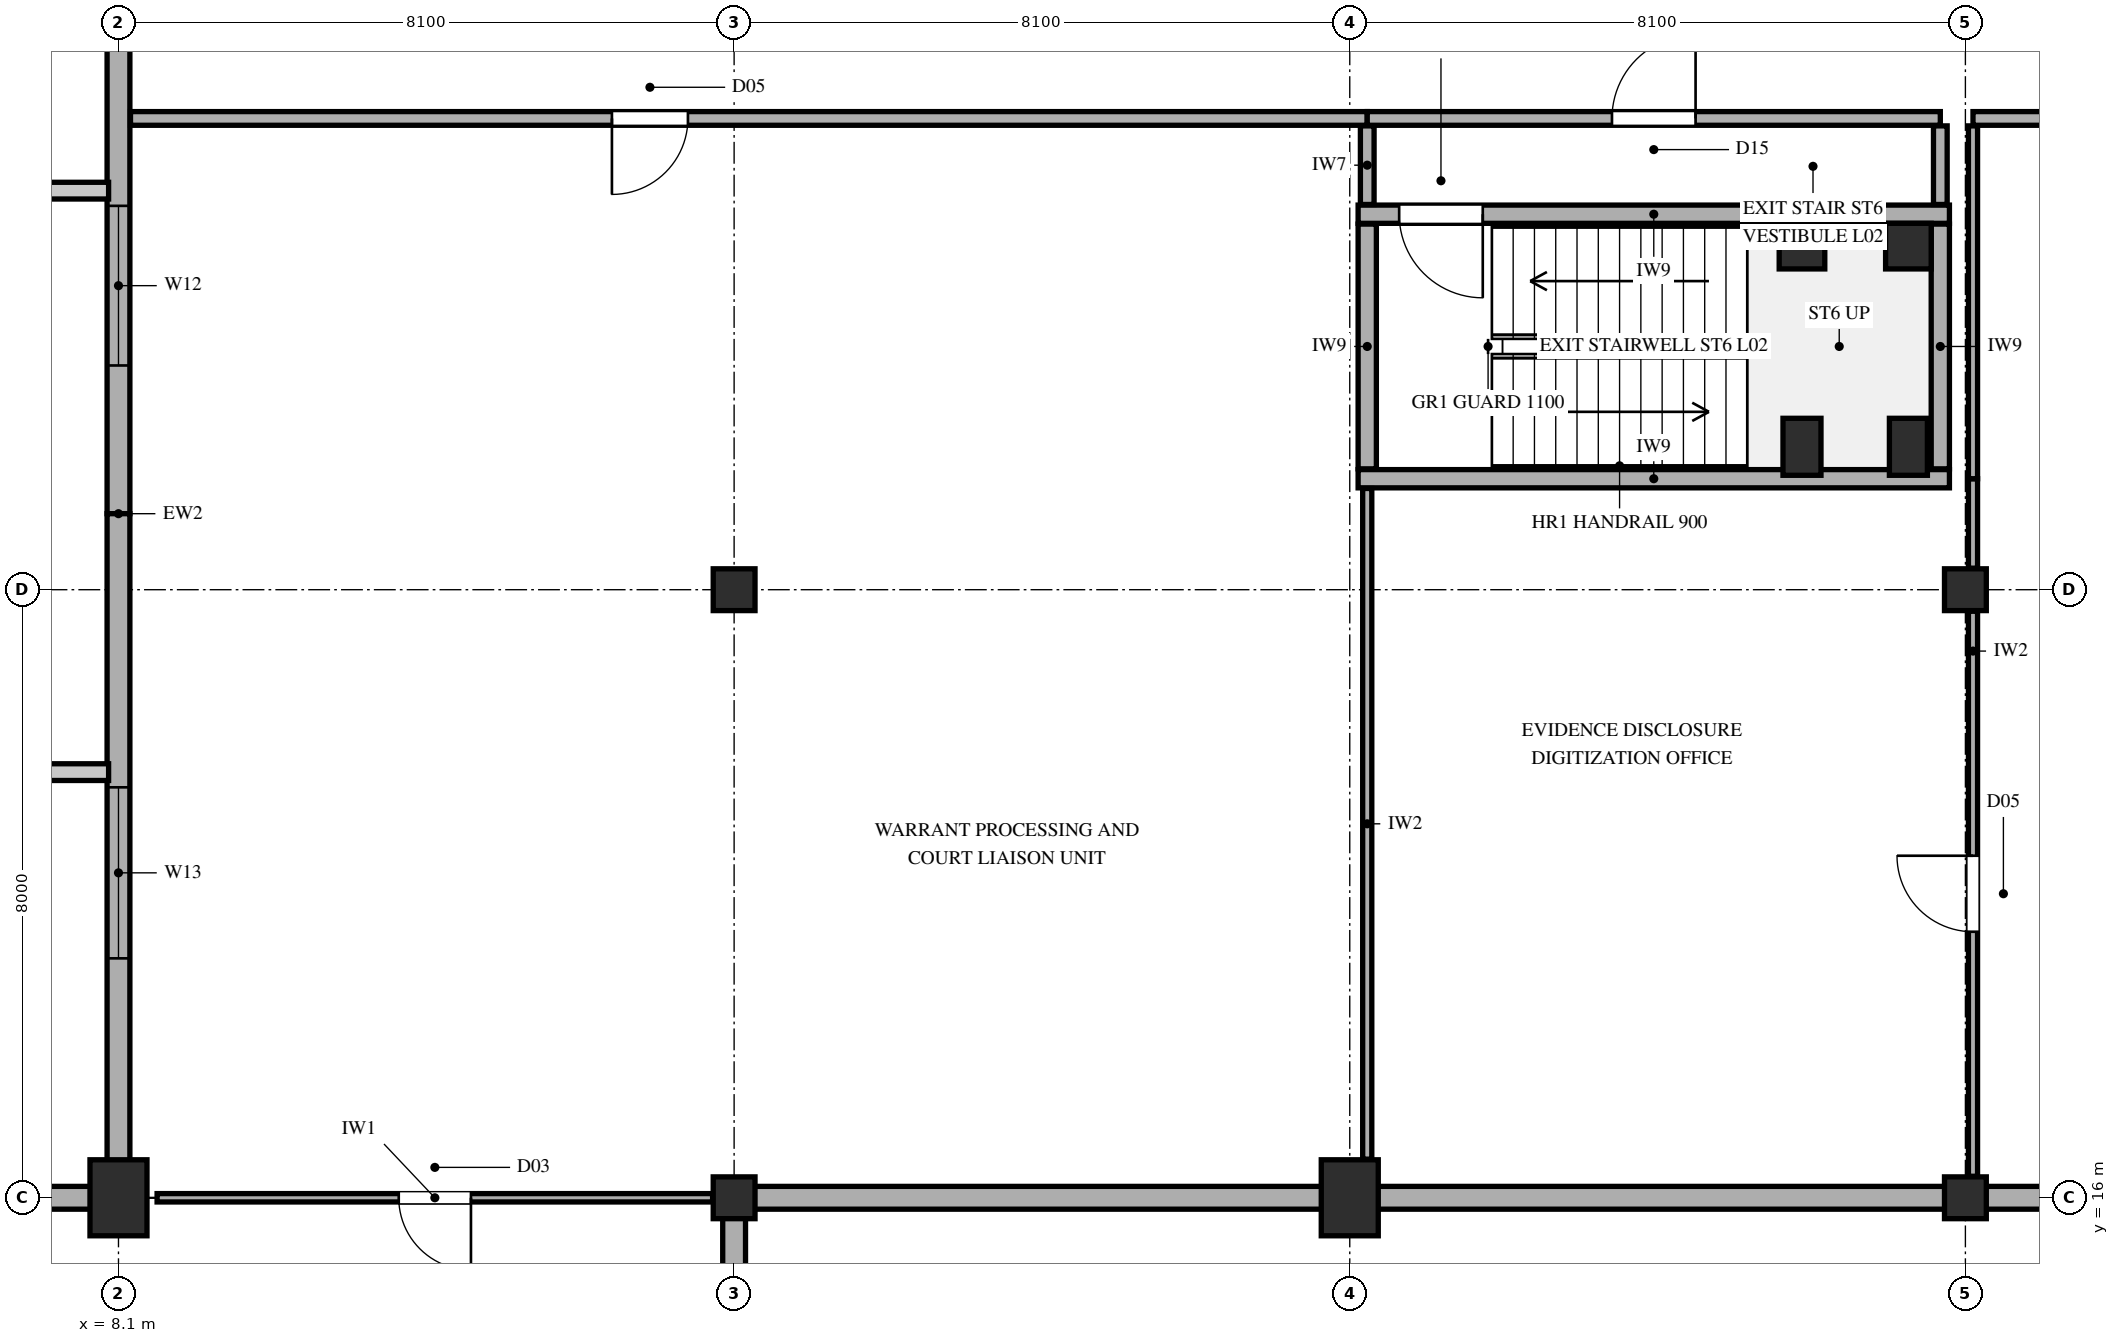
"""IFC4 building model, lengths in metres.
Left out: names, types, materials, properties, quantities, classifications, styles, units other than length and angle.
Written with IfcOpenShell. Run it as: python <this file> out.ifc"""

import sys

from ifc_helpers import new_model, si_unit, direction, frame, frame_2d, origin, origin_2d, place, context, subcontext, project, spatial, rectangle, extrude, element, fill, save


model = new_model("IFC4")
c1 = context("Model", 3, precision=1e-05, world=origin(), true_north=direction((0.0, 1.0)))
c2 = subcontext(c1, "Body", "Model", "MODEL_VIEW")
j1 = project(units=[si_unit("LENGTHUNIT", "METRE"), si_unit("PLANEANGLEUNIT", "RADIAN")], contexts=[c1])
p1 = place(None, origin())
s1 = spatial("IfcSite", under=j1, at=p1, CompositionType="ELEMENT")
p2 = place(p1, origin())
s2 = spatial("IfcBuilding", under=s1, at=p2, CompositionType="ELEMENT")
p3 = place(p2, frame((0.0, 0.0, 10.2)))
s3 = spatial("IfcBuildingStorey", under=s2, at=p3, CompositionType="ELEMENT", Elevation=10.2)
p4 = place(p3, frame((8.1, 16.0, 0.0), z_axis=(0.0, 0.0, 1.0), x_axis=(1.0, 0.0, 0.0)))
e1 = element("IfcColumn", 1, at=p4, inside=s3, PredefinedType="COLUMN", context=c2, shape_type="SweptSolid", body=[
    extrude(rectangle(XDim=0.75, YDim=1.0, at=origin_2d()), origin(), (0.0, 0.0, 1.0), 4.5),
])
for number, where, z_axis, x_axis in (
    (2, (16.2, 16.0, 0.0), (0.0, 0.0, 1.0), (1.0, 0.0, 0.0)),
    (3, (16.2, 24.0, 0.0), (0.0, 0.0, 1.0), (1.0, 0.0, 0.0)),
):
    element("IfcColumn", number, at=place(p3, frame(where, z_axis=z_axis, x_axis=x_axis)), inside=s3, PredefinedType="COLUMN", context=c2, shape_type="SweptSolid", body=[
        extrude(rectangle(XDim=0.55, YDim=0.55, at=origin_2d()), origin(), (0.0, 0.0, 1.0), 4.24),
    ])
p5 = place(p3, frame((24.3, 16.0, 0.0), z_axis=(0.0, 0.0, 1.0), x_axis=(1.0, 0.0, 0.0)))
e4 = element("IfcColumn", 4, at=p5, inside=s3, PredefinedType="COLUMN", context=c2, shape_type="SweptSolid", body=[
    extrude(rectangle(XDim=0.75, YDim=1.0, at=origin_2d()), origin(), (0.0, 0.0, 1.0), 4.5),
])
p6 = place(p3, frame((30.25, 25.88, 0.0), z_axis=(0.0, 0.0, 1.0), x_axis=(1.0, 0.0, 0.0)))
e5 = element("IfcColumn", 5, at=p6, inside=s3, PredefinedType="COLUMN", context=c2, shape_type="SweptSolid", body=[
    extrude(rectangle(XDim=0.5, YDim=0.75, at=origin_2d()), origin(), (0.0, 0.0, 1.0), 4.5),
])
p7 = place(p3, frame((30.25, 28.52, 0.0), z_axis=(0.0, 0.0, 1.0), x_axis=(1.0, 0.0, 0.0)))
e6 = element("IfcColumn", 6, at=p7, inside=s3, PredefinedType="COLUMN", context=c2, shape_type="SweptSolid", body=[
    extrude(rectangle(XDim=0.6, YDim=0.6, at=origin_2d()), origin(), (0.0, 0.0, 1.0), 4.5),
])
p8 = place(p3, frame((31.65, 25.88, 0.0), z_axis=(0.0, 0.0, 1.0), x_axis=(1.0, 0.0, 0.0)))
e7 = element("IfcColumn", 7, at=p8, inside=s3, PredefinedType="COLUMN", context=c2, shape_type="SweptSolid", body=[
    extrude(rectangle(XDim=0.5, YDim=0.75, at=origin_2d()), origin(), (0.0, 0.0, 1.0), 4.5),
])
p9 = place(p3, frame((31.65, 28.52, 0.0), z_axis=(0.0, 0.0, 1.0), x_axis=(1.0, 0.0, 0.0)))
e8 = element("IfcColumn", 8, at=p9, inside=s3, PredefinedType="COLUMN", context=c2, shape_type="SweptSolid", body=[
    extrude(rectangle(XDim=0.6, YDim=0.6, at=origin_2d()), origin(), (0.0, 0.0, 1.0), 4.5),
])
for number, where, z_axis, x_axis in (
    (9, (32.4, 16.0, 0.0), (0.0, 0.0, 1.0), (1.0, 0.0, 0.0)),
    (10, (32.4, 24.0, 0.0), (0.0, 0.0, 1.0), (1.0, 0.0, 0.0)),
):
    element("IfcColumn", number, at=place(p3, frame(where, z_axis=z_axis, x_axis=x_axis)), inside=s3, PredefinedType="COLUMN", context=c2, shape_type="SweptSolid", body=[
        extrude(rectangle(XDim=0.55, YDim=0.55, at=origin_2d()), origin(), (0.0, 0.0, 1.0), 4.24),
    ])
p10 = place(p3, frame((16.2, 0.0, 0.0), z_axis=(0.0, 0.0, 1.0), x_axis=(0.0, 1.0, 0.0)))
e11 = element("IfcWall", 11, at=p10, inside=s3, PredefinedType="SOLIDWALL", context=c2, shape_type="SweptSolid", body=[
    extrude(rectangle(XDim=16.0, YDim=0.3, at=frame_2d((8.0, 0.0))), origin(), (0.0, 0.0, 1.0), 3.769),
])
p11 = place(p3, frame((16.2, 16.0, 0.0), z_axis=(0.0, 0.0, 1.0), x_axis=(1.0, 0.0, 0.0)))
e12 = element("IfcWall", 12, at=p11, inside=s3, PredefinedType="SOLIDWALL", context=c2, shape_type="SweptSolid", body=[
    extrude(rectangle(XDim=16.2, YDim=0.3, at=frame_2d((8.1, 0.0))), origin(), (0.0, 0.0, 1.0), 3.544),
])
p12 = place(p3, frame((32.4, 16.0, 0.0), z_axis=(0.0, 0.0, 1.0), x_axis=(1.0, 0.0, 0.0)))
e13 = element("IfcWall", 13, at=p12, inside=s3, PredefinedType="SOLIDWALL", context=c2, shape_type="SweptSolid", body=[
    extrude(rectangle(XDim=16.2, YDim=0.3, at=frame_2d((8.1, 0.0))), origin(), (0.0, 0.0, 1.0), 3.544),
])
p13 = place(p3, frame((8.1, 34.0, 0.0), z_axis=(0.0, 0.0, 1.0), x_axis=(0.0, -1.0, 0.0)))
e14 = element("IfcWall", 14, at=p13, inside=s3, PredefinedType="SOLIDWALL", context=c2, shape_type="SweptSolid", body=[
    extrude(rectangle(XDim=9.0, YDim=0.3, at=frame_2d((4.5, 0.0))), origin(), (0.0, 0.0, 1.0), 3.366),
])
p14 = place(p13, frame((4.95, 0.0, 0.95)))
e15 = element("IfcOpeningElement", 15, at=p14, cuts=e14, PredefinedType="OPENING", context=c2, shape_type="SweptSolid", body=[
    extrude(rectangle(XDim=2.1, YDim=1.8, at=frame_2d((1.05, 0.9))), frame((0.0, 0.16, 0.0), z_axis=(0.0, -1.0, 0.0), x_axis=(1.0, 0.0, 0.0)), (0.0, 0.0, 1.0), 0.32),
])
p15 = place(p3, frame((8.1, 25.0, 0.0), z_axis=(0.0, 0.0, 1.0), x_axis=(0.0, -1.0, 0.0)))
e16 = element("IfcWall", 16, at=p15, inside=s3, PredefinedType="SOLIDWALL", context=c2, shape_type="SweptSolid", body=[
    extrude(rectangle(XDim=9.0, YDim=0.3, at=frame_2d((4.5, 0.0))), origin(), (0.0, 0.0, 1.0), 3.366),
])
p16 = place(p15, frame((3.6, 0.0, 0.95)))
e17 = element("IfcOpeningElement", 17, at=p16, cuts=e16, PredefinedType="OPENING", context=c2, shape_type="SweptSolid", body=[
    extrude(rectangle(XDim=2.25, YDim=1.8, at=frame_2d((1.125, 0.9))), frame((0.0, 0.16, 0.0), z_axis=(0.0, -1.0, 0.0), x_axis=(1.0, 0.0, 0.0)), (0.0, 0.0, 1.0), 0.32),
])
p17 = place(p3, frame((8.1, 16.0, 0.0), z_axis=(0.0, 0.0, 1.0), x_axis=(-1.0, 0.0, 0.0)))
e18 = element("IfcWall", 18, at=p17, inside=s3, PredefinedType="SOLIDWALL", context=c2, shape_type="SweptSolid", body=[
    extrude(rectangle(XDim=8.1, YDim=0.3, at=frame_2d((4.05, 0.0))), origin(), (0.0, 0.0, 1.0), 3.619),
])
p18 = place(p17, frame((2.7, 0.0, 0.95)))
e19 = element("IfcOpeningElement", 19, at=p18, cuts=e18, PredefinedType="OPENING", context=c2, shape_type="SweptSolid", body=[
    extrude(rectangle(XDim=2.4, YDim=1.6, at=frame_2d((1.2, 0.8))), frame((0.0, 0.16, 0.0), z_axis=(0.0, -1.0, 0.0), x_axis=(1.0, 0.0, 0.0)), (0.0, 0.0, 1.0), 0.32),
])
p19 = place(p3, frame((24.41, 25.46, 0.0), z_axis=(0.0, 0.0, 1.0), x_axis=(1.0, 0.0, 0.0)))
e20 = element("IfcWall", 20, at=p19, inside=s3, PredefinedType="PARTITIONING", context=c2, shape_type="SweptSolid", body=[
    extrude(rectangle(XDim=7.78, YDim=0.24, at=frame_2d((3.89, 0.0))), origin(), (0.0, 0.0, 1.0), 4.24),
])
p20 = place(p3, frame((24.41, 28.94, 0.0), z_axis=(0.0, 0.0, 1.0), x_axis=(1.0, 0.0, 0.0)))
e21 = element("IfcWall", 21, at=p20, inside=s3, PredefinedType="PARTITIONING", context=c2, shape_type="SweptSolid", body=[
    extrude(rectangle(XDim=7.78, YDim=0.24, at=frame_2d((3.89, 0.0))), origin(), (0.0, 0.0, 1.0), 4.24),
])
p21 = place(p20, frame((0.54, 0.0, 0.0)))
e22 = element("IfcOpeningElement", 22, at=p21, cuts=e21, PredefinedType="OPENING", context=c2, shape_type="SweptSolid", body=[
    extrude(rectangle(XDim=1.1, YDim=2.2, at=frame_2d((0.55, 1.1))), frame((0.0, 0.13, 0.0), z_axis=(0.0, -1.0, 0.0), x_axis=(1.0, 0.0, 0.0)), (0.0, 0.0, 1.0), 0.26),
])
p22 = place(p3, frame((24.53, 25.59, 0.0), z_axis=(0.0, 0.0, 1.0), x_axis=(0.0, 1.0, 0.0)))
e23 = element("IfcWall", 23, at=p22, inside=s3, PredefinedType="PARTITIONING", context=c2, shape_type="SweptSolid", body=[
    extrude(rectangle(XDim=3.22, YDim=0.24, at=frame_2d((1.61, 0.0))), origin(), (0.0, 0.0, 1.0), 3.366),
])
p23 = place(p3, frame((32.07, 25.59, 0.0), z_axis=(0.0, 0.0, 1.0), x_axis=(0.0, 1.0, 0.0)))
e24 = element("IfcWall", 24, at=p23, inside=s3, PredefinedType="PARTITIONING", context=c2, shape_type="SweptSolid", body=[
    extrude(rectangle(XDim=3.22, YDim=0.24, at=frame_2d((1.61, 0.0))), origin(), (0.0, 0.0, 1.0), 4.24),
])
p24 = place(p3, frame((8.608, 16.0, 0.0), z_axis=(0.0, 0.0, 1.0), x_axis=(1.0, 0.0, 0.0)))
e25 = element("IfcWall", 25, at=p24, inside=s3, PredefinedType="PARTITIONING", context=c2, shape_type="SweptSolid", body=[
    extrude(rectangle(XDim=7.309, YDim=0.11, at=frame_2d((3.655, 0.0))), origin(), (0.0, 0.0, 1.0), 3.62),
])
p25 = place(p24, frame((3.179, 0.0, 0.0)))
e26 = element("IfcOpeningElement", 26, at=p25, cuts=e25, PredefinedType="OPENING", context=c2, shape_type="SweptSolid", body=[
    extrude(rectangle(XDim=0.95, YDim=2.15, at=frame_2d((0.475, 1.075))), frame((0.0, 0.065, 0.0), z_axis=(0.0, -1.0, 0.0), x_axis=(1.0, 0.0, 0.0)), (0.0, 0.0, 1.0), 0.13),
])
p26 = place(p3, frame((8.258, 30.2, 0.0), z_axis=(0.0, 0.0, 1.0), x_axis=(1.0, 0.0, 0.0)))
e27 = element("IfcWall", 27, at=p26, inside=s3, PredefinedType="PARTITIONING", context=c2, shape_type="SweptSolid", body=[
    extrude(rectangle(XDim=16.272, YDim=0.18, at=frame_2d((8.136, 0.0))), origin(), (0.0, 0.0, 1.0), 4.24),
])
p27 = place(p26, frame((6.334, 0.0, 0.0)))
e28 = element("IfcOpeningElement", 28, at=p27, cuts=e27, PredefinedType="OPENING", context=c2, shape_type="SweptSolid", body=[
    extrude(rectangle(XDim=1.0, YDim=2.2, at=frame_2d((0.5, 1.1))), frame((0.0, 0.1, 0.0), z_axis=(0.0, -1.0, 0.0), x_axis=(1.0, 0.0, 0.0)), (0.0, 0.0, 1.0), 0.2),
])
p28 = place(p3, frame((24.53, 30.2, 0.0), z_axis=(0.0, 0.0, 1.0), x_axis=(1.0, 0.0, 0.0)))
e29 = element("IfcWall", 29, at=p28, inside=s3, PredefinedType="PARTITIONING", context=c2, shape_type="SweptSolid", body=[
    extrude(rectangle(XDim=7.54, YDim=0.18, at=frame_2d((3.77, 0.0))), origin(), (0.0, 0.0, 1.0), 4.24),
])
p29 = place(p28, frame((3.22, 0.0, 0.0)))
e30 = element("IfcOpeningElement", 30, at=p29, cuts=e29, PredefinedType="OPENING", context=c2, shape_type="SweptSolid", body=[
    extrude(rectangle(XDim=1.1, YDim=2.2, at=frame_2d((0.55, 1.1))), frame((0.0, 0.1, 0.0), z_axis=(0.0, -1.0, 0.0), x_axis=(1.0, 0.0, 0.0)), (0.0, 0.0, 1.0), 0.2),
])
p30 = place(p3, frame((32.5, 30.2, 0.0), z_axis=(0.0, 0.0, 1.0), x_axis=(1.0, 0.0, 0.0)))
e31 = element("IfcWall", 31, at=p30, inside=s3, PredefinedType="PARTITIONING", context=c2, shape_type="SweptSolid", body=[
    extrude(rectangle(XDim=32.29, YDim=0.18, at=frame_2d((16.145, 0.0))), origin(), (0.0, 0.0, 1.0), 4.24),
])
p31 = place(p30, frame((15.595, 0.0, 0.0)))
e32 = element("IfcOpeningElement", 32, at=p31, cuts=e31, PredefinedType="OPENING", context=c2, shape_type="SweptSolid", body=[
    extrude(rectangle(XDim=1.1, YDim=2.2, at=frame_2d((0.55, 1.1))), frame((0.0, 0.1, 0.0), z_axis=(0.0, -1.0, 0.0), x_axis=(1.0, 0.0, 0.0)), (0.0, 0.0, 1.0), 0.2),
])
p32 = place(p3, frame((24.53, 16.508, 0.0), z_axis=(0.0, 0.0, 1.0), x_axis=(0.0, 1.0, 0.0)))
e33 = element("IfcWall", 33, at=p32, inside=s3, PredefinedType="PARTITIONING", context=c2, shape_type="SweptSolid", body=[
    extrude(rectangle(XDim=8.824, YDim=0.12, at=frame_2d((4.412, 0.0))), origin(), (0.0, 0.0, 1.0), 3.366),
])
p33 = place(p3, frame((24.53, 29.068, 0.0), z_axis=(0.0, 0.0, 1.0), x_axis=(0.0, 1.0, 0.0)))
e34 = element("IfcWall", 34, at=p33, inside=s3, PredefinedType="PARTITIONING", context=c2, shape_type="SweptSolid", body=[
    extrude(rectangle(XDim=1.034, YDim=0.18, at=frame_2d((0.517, 0.0))), origin(), (0.0, 0.0, 1.0), 3.366),
])
p34 = place(p3, frame((32.07, 29.068, 0.0), z_axis=(0.0, 0.0, 1.0), x_axis=(0.0, 1.0, 0.0)))
e35 = element("IfcWall", 35, at=p34, inside=s3, PredefinedType="PARTITIONING", context=c2, shape_type="SweptSolid", body=[
    extrude(rectangle(XDim=1.034, YDim=0.18, at=frame_2d((0.517, 0.0))), origin(), (0.0, 0.0, 1.0), 4.24),
])
p35 = place(p3, frame((32.5, 16.283, 0.0), z_axis=(0.0, 0.0, 1.0), x_axis=(0.0, 1.0, 0.0)))
e36 = element("IfcWall", 36, at=p35, inside=s3, PredefinedType="PARTITIONING", context=c2, shape_type="SweptSolid", body=[
    extrude(rectangle(XDim=7.434, YDim=0.12, at=frame_2d((3.717, 0.0))), origin(), (0.0, 0.0, 1.0), 3.769),
])
p36 = place(p35, frame((3.217, 0.0, 0.0)))
e37 = element("IfcOpeningElement", 37, at=p36, cuts=e36, PredefinedType="OPENING", context=c2, shape_type="SweptSolid", body=[
    extrude(rectangle(XDim=1.0, YDim=2.2, at=frame_2d((0.5, 1.1))), frame((0.0, 0.07, 0.0), z_axis=(0.0, -1.0, 0.0), x_axis=(1.0, 0.0, 0.0)), (0.0, 0.0, 1.0), 0.14),
])
p37 = place(p3, frame((32.5, 24.283, 0.0), z_axis=(0.0, 0.0, 1.0), x_axis=(0.0, 1.0, 0.0)))
e38 = element("IfcWall", 38, at=p37, inside=s3, PredefinedType="PARTITIONING", context=c2, shape_type="SweptSolid", body=[
    extrude(rectangle(XDim=1.177, YDim=0.12, at=frame_2d((0.588, 0.0))), origin(), (0.0, 0.0, 1.0), 3.769),
])
p38 = place(p3, frame((32.5, 25.46, 0.0), z_axis=(0.0, 0.0, 1.0), x_axis=(0.0, 1.0, 0.0)))
e39 = element("IfcWall", 39, at=p38, inside=s3, PredefinedType="PARTITIONING", context=c2, shape_type="SweptSolid", body=[
    extrude(rectangle(XDim=4.642, YDim=0.12, at=frame_2d((2.321, 0.0))), origin(), (0.0, 0.0, 1.0), 3.769),
])
p39 = place(p14, origin())
e40 = element("IfcWindow", 40, at=p39, inside=s3, PartitioningType="DOUBLE_PANEL_VERTICAL", PredefinedType="WINDOW", context=c2, shape_type="SweptSolid", body=[
    extrude(rectangle(XDim=2.1, YDim=1.8, at=frame_2d((1.05, 0.9))), frame((0.0, 0.03, 0.0), z_axis=(0.0, -1.0, 0.0), x_axis=(1.0, 0.0, 0.0)), (0.0, 0.0, 1.0), 0.06),
])
fill(e15, e40)
p40 = place(p16, origin())
e41 = element("IfcWindow", 41, at=p40, inside=s3, PartitioningType="TRIPLE_PANEL_VERTICAL", PredefinedType="WINDOW", context=c2, shape_type="SweptSolid", body=[
    extrude(rectangle(XDim=2.25, YDim=1.8, at=frame_2d((1.125, 0.9))), frame((0.0, 0.03, 0.0), z_axis=(0.0, -1.0, 0.0), x_axis=(1.0, 0.0, 0.0)), (0.0, 0.0, 1.0), 0.06),
])
fill(e17, e41)
p41 = place(p21, frame((1.1, 0.0, 0.0), z_axis=(0.0, 0.0, 1.0), x_axis=(-1.0, 0.0, 0.0)))
e42 = element("IfcDoor", 42, at=p41, inside=s3, OperationType="SINGLE_SWING_RIGHT", PredefinedType="DOOR", context=c2, shape_type="SweptSolid", body=[
    extrude(rectangle(XDim=1.1, YDim=2.2, at=frame_2d((0.55, 1.1))), frame((0.0, 0.025, 0.0), z_axis=(0.0, -1.0, 0.0), x_axis=(1.0, 0.0, 0.0)), (0.0, 0.0, 1.0), 0.05),
])
fill(e22, e42)
p42 = place(p25, frame((0.95, 0.0, 0.0), z_axis=(0.0, 0.0, 1.0), x_axis=(-1.0, 0.0, 0.0)))
e43 = element("IfcDoor", 43, at=p42, inside=s3, OperationType="SINGLE_SWING_RIGHT", PredefinedType="DOOR", context=c2, shape_type="SweptSolid", body=[
    extrude(rectangle(XDim=0.95, YDim=2.15, at=frame_2d((0.475, 1.075))), frame((0.0, 0.025, 0.0), z_axis=(0.0, -1.0, 0.0), x_axis=(1.0, 0.0, 0.0)), (0.0, 0.0, 1.0), 0.05),
])
fill(e26, e43)
p43 = place(p27, frame((1.0, 0.0, 0.0), z_axis=(0.0, 0.0, 1.0), x_axis=(-1.0, 0.0, 0.0)))
e44 = element("IfcDoor", 44, at=p43, inside=s3, OperationType="SINGLE_SWING_LEFT", PredefinedType="DOOR", context=c2, shape_type="SweptSolid", body=[
    extrude(rectangle(XDim=1.0, YDim=2.2, at=frame_2d((0.5, 1.1))), frame((0.0, 0.025, 0.0), z_axis=(0.0, -1.0, 0.0), x_axis=(1.0, 0.0, 0.0)), (0.0, 0.0, 1.0), 0.05),
])
fill(e28, e44)
p44 = place(p29, origin())
e45 = element("IfcDoor", 45, at=p44, inside=s3, OperationType="SINGLE_SWING_RIGHT", PredefinedType="DOOR", context=c2, shape_type="SweptSolid", body=[
    extrude(rectangle(XDim=1.1, YDim=2.2, at=frame_2d((0.55, 1.1))), frame((0.0, 0.025, 0.0), z_axis=(0.0, -1.0, 0.0), x_axis=(1.0, 0.0, 0.0)), (0.0, 0.0, 1.0), 0.05),
])
fill(e30, e45)
p45 = place(p36, origin())
e46 = element("IfcDoor", 46, at=p45, inside=s3, OperationType="SINGLE_SWING_RIGHT", PredefinedType="DOOR", context=c2, shape_type="SweptSolid", body=[
    extrude(rectangle(XDim=1.0, YDim=2.2, at=frame_2d((0.5, 1.1))), frame((0.0, 0.025, 0.0), z_axis=(0.0, -1.0, 0.0), x_axis=(1.0, 0.0, 0.0)), (0.0, 0.0, 1.0), 0.05),
])
fill(e37, e46)
save(model, sys.argv[1])
